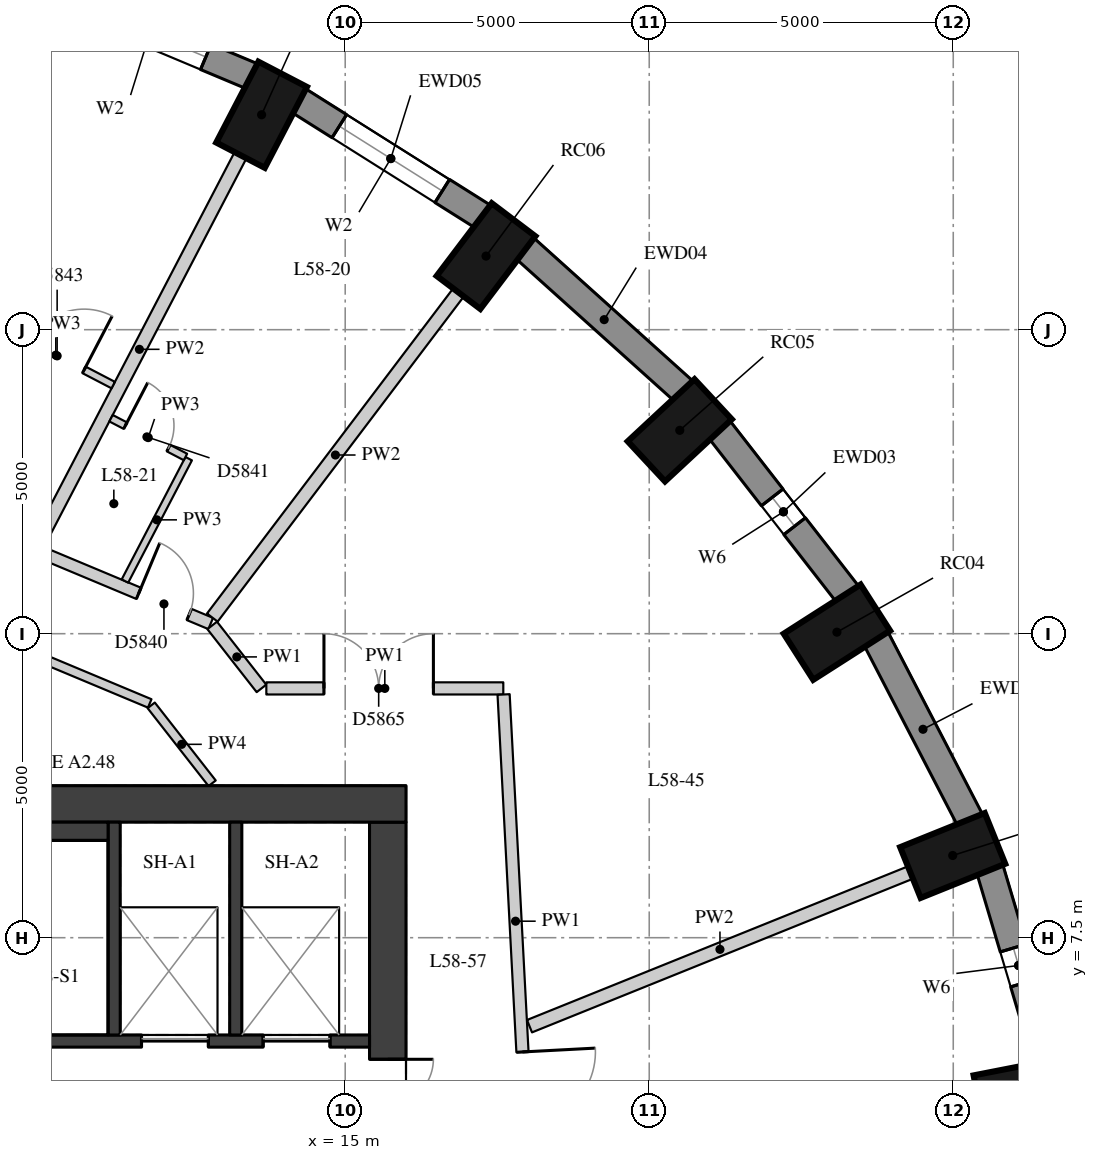
"""IFC4 building model, lengths in metres.
Left out: names, types, materials, properties, quantities, classifications, styles, units other than length and angle.
Written with IfcOpenShell. Run it as: python <this file> out.ifc"""

import sys

from ifc_helpers import new_model, si_unit, direction, frame, frame_2d, origin, origin_2d, place, context, subcontext, project, spatial, rectangle, extrude, element, fill, save


model = new_model("IFC4")
c1 = context("Model", 3, precision=1e-05, world=origin(), true_north=direction((0.0, 1.0)))
c2 = subcontext(c1, "Body", "Model", "MODEL_VIEW")
j1 = project(units=[si_unit("LENGTHUNIT", "METRE"), si_unit("PLANEANGLEUNIT", "RADIAN")], contexts=[c1])
p1 = place(None, origin())
s1 = spatial("IfcSite", under=j1, at=p1, CompositionType="ELEMENT")
p2 = place(p1, origin())
s2 = spatial("IfcBuilding", under=s1, at=p2, CompositionType="ELEMENT")
p3 = place(p2, frame((0.0, 0.0, 205.7)))
s3 = spatial("IfcBuildingStorey", under=s2, at=p3, CompositionType="ELEMENT", Elevation=205.7)
for number, where, z_axis, x_axis in (
    (1, (26.157, 4.937, 0.0), (0.0, 0.0, 1.0), (0.981, 0.192, 0.0)),
    (2, (24.991, 8.852, 0.0), (0.0, 0.0, 1.0), (0.927, 0.374, 0.0)),
    (3, (23.087, 12.525, 0.0), (0.0, 0.0, 1.0), (0.842, 0.539, 0.0)),
    (4, (20.502, 15.845, 0.0), (0.0, 0.0, 1.0), (0.732, 0.681, 0.0)),
    (5, (17.316, 18.71, 0.0), (0.0, 0.0, 1.0), (0.604, 0.797, 0.0)),
    (6, (13.625, 21.035, 0.0), (0.0, 0.0, 1.0), (0.462, 0.887, 0.0)),
    (7, (9.541, 22.748, 0.0), (0.0, 0.0, 1.0), (0.312, 0.95, 0.0)),
):
    element("IfcColumn", number, at=place(p3, frame(where, z_axis=z_axis, x_axis=x_axis)), inside=s3, PredefinedType="COLUMN", context=c2, shape_type="SweptSolid", body=[
        extrude(rectangle(XDim=1.5, YDim=0.9, at=origin_2d()), origin(), (0.0, 0.0, 1.0), 3.3),
    ])
p4 = place(p3, frame((26.548, 5.452, 0.0), z_axis=(0.0, 0.0, 1.0), x_axis=(-0.285444972963, 0.958395099847, 0.0)))
e8 = element("IfcWall", 8, at=p4, inside=s3, PredefinedType="SOLIDWALL", context=c2, shape_type="SweptSolid", body=[
    extrude(rectangle(XDim=3.32, YDim=0.45, at=frame_2d((1.66, 0.0))), origin(), (0.0, 0.0, 1.0), 3.02),
])
p5 = place(p4, frame((1.36, 0.0, 0.4)))
e9 = element("IfcOpeningElement", 9, at=p5, cuts=e8, PredefinedType="OPENING", context=c2, shape_type="SweptSolid", body=[
    extrude(rectangle(XDim=0.6, YDim=1.75, at=frame_2d((0.3, 0.875))), frame((0.0, 0.235, 0.0), z_axis=(0.0, -1.0, 0.0), x_axis=(1.0, 0.0, 0.0)), (0.0, 0.0, 1.0), 0.47),
])
p6 = place(p3, frame((25.278, 9.432, 0.0), z_axis=(0.0, 0.0, 1.0), x_axis=(-0.460175500475, 0.887827972505, 0.0)))
e10 = element("IfcWall", 10, at=p6, inside=s3, PredefinedType="SOLIDWALL", context=c2, shape_type="SweptSolid", body=[
    extrude(rectangle(XDim=3.371, YDim=0.45, at=frame_2d((1.685, 0.0))), origin(), (0.0, 0.0, 1.0), 3.02),
])
p7 = place(p3, frame((23.263, 13.148, 0.0), z_axis=(0.0, 0.0, 1.0), x_axis=(-0.614220816451, 0.789134201919, 0.0)))
e11 = element("IfcWall", 11, at=p7, inside=s3, PredefinedType="SOLIDWALL", context=c2, shape_type="SweptSolid", body=[
    extrude(rectangle(XDim=3.438, YDim=0.45, at=frame_2d((1.719, 0.0))), origin(), (0.0, 0.0, 1.0), 3.02),
])
p8 = place(p7, frame((1.419, 0.0, 0.4)))
e12 = element("IfcOpeningElement", 12, at=p8, cuts=e11, PredefinedType="OPENING", context=c2, shape_type="SweptSolid", body=[
    extrude(rectangle(XDim=0.6, YDim=1.75, at=frame_2d((0.3, 0.875))), frame((0.0, 0.235, 0.0), z_axis=(0.0, -1.0, 0.0), x_axis=(1.0, 0.0, 0.0)), (0.0, 0.0, 1.0), 0.47),
])
p9 = place(p3, frame((20.565, 16.49, 0.0), z_axis=(0.0, 0.0, 1.0), x_axis=(-0.743442727602, 0.668799604348, 0.0)))
e13 = element("IfcWall", 13, at=p9, inside=s3, PredefinedType="SOLIDWALL", context=c2, shape_type="SweptSolid", body=[
    extrude(rectangle(XDim=3.513, YDim=0.45, at=frame_2d((1.756, 0.0))), origin(), (0.0, 0.0, 1.0), 3.02),
])
p10 = place(p3, frame((17.267, 19.358, 0.0), z_axis=(0.0, 0.0, 1.0), x_axis=(-0.846119146727, 0.532993798783, 0.0)))
e14 = element("IfcWall", 14, at=p10, inside=s3, PredefinedType="SOLIDWALL", context=c2, shape_type="SweptSolid", body=[
    extrude(rectangle(XDim=3.587, YDim=0.45, at=frame_2d((1.793, 0.0))), origin(), (0.0, 0.0, 1.0), 3.02),
])
p11 = place(p10, frame((0.793, 0.0, 0.4)))
e15 = element("IfcOpeningElement", 15, at=p11, cuts=e14, PredefinedType="OPENING", context=c2, shape_type="SweptSolid", body=[
    extrude(rectangle(XDim=2.0, YDim=1.75, at=frame_2d((1.0, 0.875))), frame((0.0, 0.235, 0.0), z_axis=(0.0, -1.0, 0.0), x_axis=(1.0, 0.0, 0.0)), (0.0, 0.0, 1.0), 0.47),
])
p12 = place(p3, frame((13.469, 21.667, 0.0), z_axis=(0.0, 0.0, 1.0), x_axis=(-0.922168222612, 0.386789050006, 0.0)))
e16 = element("IfcWall", 16, at=p12, inside=s3, PredefinedType="SOLIDWALL", context=c2, shape_type="SweptSolid", body=[
    extrude(rectangle(XDim=3.651, YDim=0.45, at=frame_2d((1.825, 0.0))), origin(), (0.0, 0.0, 1.0), 3.02),
])
p13 = place(p12, frame((0.825, 0.0, 0.4)))
e17 = element("IfcOpeningElement", 17, at=p13, cuts=e16, PredefinedType="OPENING", context=c2, shape_type="SweptSolid", body=[
    extrude(rectangle(XDim=2.0, YDim=1.75, at=frame_2d((1.0, 0.875))), frame((0.0, 0.235, 0.0), z_axis=(0.0, -1.0, 0.0), x_axis=(1.0, 0.0, 0.0)), (0.0, 0.0, 1.0), 0.47),
])
p14 = place(p3, frame((15.7, -9.4, 0.0), z_axis=(0.0, 0.0, 1.0), x_axis=(0.0, 1.0, 0.0)))
e18 = element("IfcWall", 18, at=p14, inside=s3, PredefinedType="SHEAR", context=c2, shape_type="SweptSolid", body=[
    extrude(rectangle(XDim=18.8, YDim=0.6, at=frame_2d((9.4, 0.0))), origin(), (0.0, 0.0, 1.0), 3.02),
])
p15 = place(p14, frame((13.4, 0.0, 0.0)))
e19 = element("IfcOpeningElement", 19, at=p15, cuts=e18, PredefinedType="OPENING", context=c2, shape_type="SweptSolid", body=[
    extrude(rectangle(XDim=1.5, YDim=2.1, at=frame_2d((0.75, 1.05))), frame((0.0, 0.31, 0.0), z_axis=(0.0, -1.0, 0.0), x_axis=(1.0, 0.0, 0.0)), (0.0, 0.0, 1.0), 0.62),
])
p16 = place(p14, frame((3.9, 0.0, 0.0)))
e20 = element("IfcOpeningElement", 20, at=p16, cuts=e18, PredefinedType="OPENING", context=c2, shape_type="SweptSolid", body=[
    extrude(rectangle(XDim=1.5, YDim=2.1, at=frame_2d((0.75, 1.05))), frame((0.0, 0.31, 0.0), z_axis=(0.0, -1.0, 0.0), x_axis=(1.0, 0.0, 0.0)), (0.0, 0.0, 1.0), 0.62),
])
p17 = place(p3, frame((4.0, 9.7, 0.0), z_axis=(0.0, 0.0, 1.0), x_axis=(1.0, 0.0, 0.0)))
e21 = element("IfcWall", 21, at=p17, inside=s3, PredefinedType="SHEAR", context=c2, shape_type="SweptSolid", body=[
    extrude(rectangle(XDim=12.0, YDim=0.6, at=frame_2d((6.0, 0.0))), origin(), (0.0, 0.0, 1.0), 3.02),
])
p18 = place(p3, frame((4.6, 5.8, 0.0), z_axis=(0.0, 0.0, 1.0), x_axis=(1.0, 0.0, 0.0)))
e22 = element("IfcWall", 22, at=p18, inside=s3, PredefinedType="SHEAR", context=c2, shape_type="SweptSolid", body=[
    extrude(rectangle(XDim=10.8, YDim=0.2, at=frame_2d((5.4, 0.0))), origin(), (0.0, 0.0, 1.0), 3.02),
])
p19 = place(p18, frame((7.05, 0.0, 0.0)))
e23 = element("IfcOpeningElement", 23, at=p19, cuts=e22, PredefinedType="OPENING", context=c2, shape_type="SweptSolid", body=[
    extrude(rectangle(XDim=1.1, YDim=2.1, at=frame_2d((0.55, 1.05))), frame((0.0, 0.11, 0.0), z_axis=(0.0, -1.0, 0.0), x_axis=(1.0, 0.0, 0.0)), (0.0, 0.0, 1.0), 0.22),
])
p20 = place(p18, frame((9.05, 0.0, 0.0)))
e24 = element("IfcOpeningElement", 24, at=p20, cuts=e22, PredefinedType="OPENING", context=c2, shape_type="SweptSolid", body=[
    extrude(rectangle(XDim=1.1, YDim=2.1, at=frame_2d((0.55, 1.05))), frame((0.0, 0.11, 0.0), z_axis=(0.0, -1.0, 0.0), x_axis=(1.0, 0.0, 0.0)), (0.0, 0.0, 1.0), 0.22),
])
for number, where, z_axis, x_axis in (
    (25, (11.2, 5.9, 0.0), (0.0, 0.0, 1.0), (0.0, 1.0, 0.0)),
    (26, (13.2, 5.9, 0.0), (0.0, 0.0, 1.0), (0.0, 1.0, 0.0)),
):
    element("IfcWall", number, at=place(p3, frame(where, z_axis=z_axis, x_axis=x_axis)), inside=s3, PredefinedType="SHEAR", context=c2, shape_type="SweptSolid", body=[
        extrude(rectangle(XDim=3.5, YDim=0.2, at=frame_2d((1.75, 0.0))), origin(), (0.0, 0.0, 1.0), 3.02),
    ])
p21 = place(p3, frame((6.22, 9.25, 0.0), z_axis=(0.0, 0.0, 1.0), x_axis=(1.0, 0.0, 0.0)))
e27 = element("IfcWall", 27, at=p21, inside=s3, PredefinedType="PARTITIONING", context=c2, shape_type="SweptSolid", body=[
    extrude(rectangle(XDim=4.88, YDim=0.3, at=frame_2d((2.44, 0.0))), origin(), (0.0, 0.0, 1.0), 3.02),
])
p22 = place(p3, frame((4.052, 16.323, 0.0), z_axis=(0.0, 0.0, 1.0), x_axis=(0.922513794011, -0.385964117322, 0.0)))
e28 = element("IfcWall", 28, at=p22, inside=s3, PredefinedType="PARTITIONING", context=c2, shape_type="SweptSolid", body=[
    extrude(rectangle(XDim=9.47, YDim=0.2, at=frame_2d((4.735, 0.0))), origin(), (0.0, 0.0, 1.0), 3.02),
])
p23 = place(p22, frame((8.186, 0.0, 0.0)))
e29 = element("IfcOpeningElement", 29, at=p23, cuts=e28, PredefinedType="OPENING", context=c2, shape_type="SweptSolid", body=[
    extrude(rectangle(XDim=0.9, YDim=2.1, at=frame_2d((0.45, 1.05))), frame((0.0, 0.11, 0.0), z_axis=(0.0, -1.0, 0.0), x_axis=(1.0, 0.0, 0.0)), (0.0, 0.0, 1.0), 0.22),
])
p24 = place(p22, frame((2.639, 0.0, 0.0)))
e30 = element("IfcOpeningElement", 30, at=p24, cuts=e28, PredefinedType="OPENING", context=c2, shape_type="SweptSolid", body=[
    extrude(rectangle(XDim=1.1, YDim=2.1, at=frame_2d((0.55, 1.05))), frame((0.0, 0.11, 0.0), z_axis=(0.0, -1.0, 0.0), x_axis=(1.0, 0.0, 0.0)), (0.0, 0.0, 1.0), 0.22),
])
p25 = place(p3, frame((12.812, 12.636, 0.0), z_axis=(0.0, 0.0, 1.0), x_axis=(0.616123044723, -0.787649918277, 0.0)))
e31 = element("IfcWall", 31, at=p25, inside=s3, PredefinedType="PARTITIONING", context=c2, shape_type="SweptSolid", body=[
    extrude(rectangle(XDim=1.315, YDim=0.2, at=frame_2d((0.658, 0.0))), origin(), (0.0, 0.0, 1.0), 3.02),
])
p26 = place(p3, frame((13.703, 11.6, 0.0), z_axis=(0.0, 0.0, 1.0), x_axis=(1.0, 0.0, 0.0)))
e32 = element("IfcWall", 32, at=p26, inside=s3, PredefinedType="PARTITIONING", context=c2, shape_type="SweptSolid", body=[
    extrude(rectangle(XDim=3.897, YDim=0.2, at=frame_2d((1.949, 0.0))), origin(), (0.0, 0.0, 1.0), 3.02),
])
p27 = place(p26, frame((0.948, 0.0, 0.0)))
e33 = element("IfcOpeningElement", 33, at=p27, cuts=e32, PredefinedType="OPENING", context=c2, shape_type="SweptSolid", body=[
    extrude(rectangle(XDim=1.8, YDim=2.1, at=frame_2d((0.9, 1.05))), frame((0.0, 0.11, 0.0), z_axis=(0.0, -1.0, 0.0), x_axis=(1.0, 0.0, 0.0)), (0.0, 0.0, 1.0), 0.22),
])
p28 = place(p3, frame((17.605, 11.5, 0.0), z_axis=(0.0, 0.0, 1.0), x_axis=(0.052701255232, -0.998610323248, 0.0)))
e34 = element("IfcWall", 34, at=p28, inside=s3, PredefinedType="PARTITIONING", context=c2, shape_type="SweptSolid", body=[
    extrude(rectangle(XDim=7.468, YDim=0.2, at=frame_2d((3.734, 0.0))), origin(), (0.0, 0.0, 1.0), 3.02),
])
p29 = place(p28, frame((5.887, 0.0, 0.0)))
e35 = element("IfcOpeningElement", 35, at=p29, cuts=e34, PredefinedType="OPENING", context=c2, shape_type="SweptSolid", body=[
    extrude(rectangle(XDim=1.2, YDim=2.1, at=frame_2d((0.6, 1.05))), frame((0.0, 0.11, 0.0), z_axis=(0.0, -1.0, 0.0), x_axis=(1.0, 0.0, 0.0)), (0.0, 0.0, 1.0), 0.22),
])
p30 = place(p3, frame((5.128, 14.138, 0.0), z_axis=(0.0, 0.0, 1.0), x_axis=(0.922514397623, -0.385962674591, 0.0)))
e36 = element("IfcWall", 36, at=p30, inside=s3, PredefinedType="PARTITIONING", context=c2, shape_type="SweptSolid", body=[
    extrude(rectangle(XDim=7.216, YDim=0.15, at=frame_2d((3.608, 0.0))), origin(), (0.0, 0.0, 1.0), 3.02),
])
p31 = place(p3, frame((11.81, 11.321, 0.0), z_axis=(0.0, 0.0, 1.0), x_axis=(0.615964296608, -0.787774069962, 0.0)))
e37 = element("IfcWall", 37, at=p31, inside=s3, PredefinedType="PARTITIONING", context=c2, shape_type="SweptSolid", body=[
    extrude(rectangle(XDim=1.627, YDim=0.15, at=frame_2d((0.813, 0.0))), origin(), (0.0, 0.0, 1.0), 3.02),
])
p32 = place(p3, frame((24.295, 8.571, 0.0), z_axis=(0.0, 0.0, 1.0), x_axis=(-0.927395972896, -0.374081153571, 0.0)))
e38 = element("IfcWall", 38, at=p32, inside=s3, PredefinedType="PARTITIONING", context=c2, shape_type="SweptSolid", body=[
    extrude(rectangle(XDim=6.755, YDim=0.22, at=frame_2d((3.377, 0.0))), origin(), (0.0, 0.0, 1.0), 3.02),
])
p33 = place(p3, frame((16.863, 18.113, 0.0), z_axis=(0.0, 0.0, 1.0), x_axis=(-0.603604669643, -0.797283765535, 0.0)))
e39 = element("IfcWall", 39, at=p33, inside=s3, PredefinedType="PARTITIONING", context=c2, shape_type="SweptSolid", body=[
    extrude(rectangle(XDim=6.707, YDim=0.22, at=frame_2d((3.354, 0.0))), origin(), (0.0, 0.0, 1.0), 3.02),
])
p34 = place(p3, frame((13.279, 20.37, 0.0), z_axis=(0.0, 0.0, 1.0), x_axis=(-0.462003878414, -0.886877903846, 0.0)))
e40 = element("IfcWall", 40, at=p34, inside=s3, PredefinedType="PARTITIONING", context=c2, shape_type="SweptSolid", body=[
    extrude(rectangle(XDim=7.2, YDim=0.22, at=frame_2d((3.6, 0.0))), origin(), (0.0, 0.0, 1.0), 3.02),
])
p35 = place(p3, frame((11.378, 13.366, 0.0), z_axis=(0.0, 0.0, 1.0), x_axis=(0.461999655972, 0.886880103442, 0.0)))
e41 = element("IfcWall", 41, at=p35, inside=s3, PredefinedType="PARTITIONING", context=c2, shape_type="SweptSolid", body=[
    extrude(rectangle(XDim=2.269, YDim=0.12, at=frame_2d((1.135, 0.0))), origin(), (0.0, 0.0, 1.0), 3.02),
])
p36 = place(p3, frame((12.373, 15.406, 0.0), z_axis=(0.0, 0.0, 1.0), x_axis=(-0.88690955386, 0.461943116922, 0.0)))
e42 = element("IfcWall", 42, at=p36, inside=s3, PredefinedType="PARTITIONING", context=c2, shape_type="SweptSolid", body=[
    extrude(rectangle(XDim=1.38, YDim=0.12, at=frame_2d((0.69, 0.0))), origin(), (0.0, 0.0, 1.0), 3.02),
])
p37 = place(p36, frame((0.315, 0.0, 0.0)))
e43 = element("IfcOpeningElement", 43, at=p37, cuts=e42, PredefinedType="OPENING", context=c2, shape_type="SweptSolid", body=[
    extrude(rectangle(XDim=0.8, YDim=2.1, at=frame_2d((0.4, 1.05))), frame((0.0, 0.07, 0.0), z_axis=(0.0, -1.0, 0.0), x_axis=(1.0, 0.0, 0.0)), (0.0, 0.0, 1.0), 0.14),
])
p38 = place(p3, frame((9.296, 17.573, 0.0), z_axis=(0.0, 0.0, 1.0), x_axis=(0.88685243949, -0.462052757346, 0.0)))
e44 = element("IfcWall", 44, at=p38, inside=s3, PredefinedType="PARTITIONING", context=c2, shape_type="SweptSolid", body=[
    extrude(rectangle(XDim=2.13, YDim=0.12, at=frame_2d((1.065, 0.0))), origin(), (0.0, 0.0, 1.0), 3.02),
])
p39 = place(p38, frame((0.59, 0.0, 0.0)))
e45 = element("IfcOpeningElement", 45, at=p39, cuts=e44, PredefinedType="OPENING", context=c2, shape_type="SweptSolid", body=[
    extrude(rectangle(XDim=1.0, YDim=2.1, at=frame_2d((0.5, 1.05))), frame((0.0, 0.07, 0.0), z_axis=(0.0, -1.0, 0.0), x_axis=(1.0, 0.0, 0.0)), (0.0, 0.0, 1.0), 0.14),
])
p40 = place(p5, origin())
e46 = element("IfcWindow", 46, at=p40, inside=s3, PartitioningType="SINGLE_PANEL", PredefinedType="WINDOW", context=c2, shape_type="SweptSolid", body=[
    extrude(rectangle(XDim=0.6, YDim=1.75, at=frame_2d((0.3, 0.875))), frame((0.0, 0.035, 0.0), z_axis=(0.0, -1.0, 0.0), x_axis=(1.0, 0.0, 0.0)), (0.0, 0.0, 1.0), 0.06),
])
fill(e9, e46)
p41 = place(p8, origin())
e47 = element("IfcWindow", 47, at=p41, inside=s3, PartitioningType="SINGLE_PANEL", PredefinedType="WINDOW", context=c2, shape_type="SweptSolid", body=[
    extrude(rectangle(XDim=0.6, YDim=1.75, at=frame_2d((0.3, 0.875))), frame((0.0, 0.035, 0.0), z_axis=(0.0, -1.0, 0.0), x_axis=(1.0, 0.0, 0.0)), (0.0, 0.0, 1.0), 0.06),
])
fill(e12, e47)
p42 = place(p11, origin())
e48 = element("IfcWindow", 48, at=p42, inside=s3, PartitioningType="SINGLE_PANEL", PredefinedType="WINDOW", context=c2, shape_type="SweptSolid", body=[
    extrude(rectangle(XDim=2.0, YDim=1.75, at=frame_2d((1.0, 0.875))), frame((0.0, 0.035, 0.0), z_axis=(0.0, -1.0, 0.0), x_axis=(1.0, 0.0, 0.0)), (0.0, 0.0, 1.0), 0.06),
])
fill(e15, e48)
p43 = place(p13, origin())
e49 = element("IfcWindow", 49, at=p43, inside=s3, PartitioningType="SINGLE_PANEL", PredefinedType="WINDOW", context=c2, shape_type="SweptSolid", body=[
    extrude(rectangle(XDim=2.0, YDim=1.75, at=frame_2d((1.0, 0.875))), frame((0.0, 0.035, 0.0), z_axis=(0.0, -1.0, 0.0), x_axis=(1.0, 0.0, 0.0)), (0.0, 0.0, 1.0), 0.06),
])
fill(e17, e49)
p44 = place(p15, origin())
e50 = element("IfcDoor", 50, at=p44, inside=s3, OperationType="DOUBLE_DOOR_SINGLE_SWING", PredefinedType="DOOR", context=c2, shape_type="SweptSolid", body=[
    extrude(rectangle(XDim=1.5, YDim=2.1, at=frame_2d((0.75, 1.05))), frame((0.0, 0.025, 0.0), z_axis=(0.0, -1.0, 0.0), x_axis=(1.0, 0.0, 0.0)), (0.0, 0.0, 1.0), 0.05),
])
fill(e19, e50)
p45 = place(p19, origin())
e51 = element("IfcDoor", 51, at=p45, inside=s3, OperationType="DOUBLE_DOOR_SLIDING", PredefinedType="DOOR", context=c2, shape_type="SweptSolid", body=[
    extrude(rectangle(XDim=1.1, YDim=2.1, at=frame_2d((0.55, 1.05))), frame((0.0, 0.025, 0.0), z_axis=(0.0, -1.0, 0.0), x_axis=(1.0, 0.0, 0.0)), (0.0, 0.0, 1.0), 0.05),
])
fill(e23, e51)
p46 = place(p20, origin())
e52 = element("IfcDoor", 52, at=p46, inside=s3, OperationType="DOUBLE_DOOR_SLIDING", PredefinedType="DOOR", context=c2, shape_type="SweptSolid", body=[
    extrude(rectangle(XDim=1.1, YDim=2.1, at=frame_2d((0.55, 1.05))), frame((0.0, 0.025, 0.0), z_axis=(0.0, -1.0, 0.0), x_axis=(1.0, 0.0, 0.0)), (0.0, 0.0, 1.0), 0.05),
])
fill(e24, e52)
p47 = place(p23, origin())
e53 = element("IfcDoor", 53, at=p47, inside=s3, OperationType="SINGLE_SWING_LEFT", PredefinedType="DOOR", context=c2, shape_type="SweptSolid", body=[
    extrude(rectangle(XDim=0.9, YDim=2.1, at=frame_2d((0.45, 1.05))), frame((0.0, 0.025, 0.0), z_axis=(0.0, -1.0, 0.0), x_axis=(1.0, 0.0, 0.0)), (0.0, 0.0, 1.0), 0.05),
])
fill(e29, e53)
p48 = place(p37, origin())
e54 = element("IfcDoor", 54, at=p48, inside=s3, OperationType="SINGLE_SWING_LEFT", PredefinedType="DOOR", context=c2, shape_type="SweptSolid", body=[
    extrude(rectangle(XDim=0.8, YDim=2.1, at=frame_2d((0.4, 1.05))), frame((0.0, 0.025, 0.0), z_axis=(0.0, -1.0, 0.0), x_axis=(1.0, 0.0, 0.0)), (0.0, 0.0, 1.0), 0.05),
])
fill(e43, e54)
p49 = place(p39, origin())
e55 = element("IfcDoor", 55, at=p49, inside=s3, OperationType="SINGLE_SWING_RIGHT", PredefinedType="DOOR", context=c2, shape_type="SweptSolid", body=[
    extrude(rectangle(XDim=1.0, YDim=2.1, at=frame_2d((0.5, 1.05))), frame((0.0, 0.025, 0.0), z_axis=(0.0, -1.0, 0.0), x_axis=(1.0, 0.0, 0.0)), (0.0, 0.0, 1.0), 0.05),
])
fill(e45, e55)
p50 = place(p29, origin())
e56 = element("IfcDoor", 56, at=p50, inside=s3, OperationType="SINGLE_SWING_LEFT", PredefinedType="DOOR", context=c2, shape_type="SweptSolid", body=[
    extrude(rectangle(XDim=1.2, YDim=2.1, at=frame_2d((0.6, 1.05))), frame((0.0, 0.025, 0.0), z_axis=(0.0, -1.0, 0.0), x_axis=(1.0, 0.0, 0.0)), (0.0, 0.0, 1.0), 0.05),
])
fill(e35, e56)
p51 = place(p27, origin())
e57 = element("IfcDoor", 57, at=p51, inside=s3, OperationType="DOUBLE_DOOR_SINGLE_SWING", PredefinedType="DOOR", context=c2, shape_type="SweptSolid", body=[
    extrude(rectangle(XDim=1.8, YDim=2.1, at=frame_2d((0.9, 1.05))), frame((0.0, 0.025, 0.0), z_axis=(0.0, -1.0, 0.0), x_axis=(1.0, 0.0, 0.0)), (0.0, 0.0, 1.0), 0.05),
])
fill(e33, e57)
save(model, sys.argv[1])
